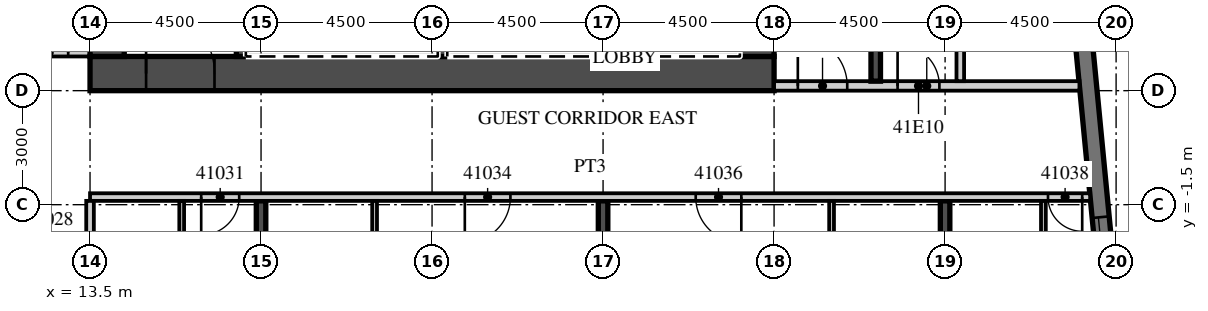
"""IFC4 building model, lengths in metres.
Left out: names, types, materials, properties, quantities, classifications, styles, units other than length and angle.
Written with IfcOpenShell. Run it as: python <this file> out.ifc"""

import sys

from ifc_helpers import new_model, si_unit, direction, frame, frame_2d, origin, place, context, subcontext, project, spatial, rectangle, extrude, element, fill, save


model = new_model("IFC4")
c1 = context("Model", 3, precision=1e-05, world=origin(), true_north=direction((0.0, 1.0)))
c2 = subcontext(c1, "Body", "Model", "MODEL_VIEW")
j1 = project(units=[si_unit("LENGTHUNIT", "METRE"), si_unit("PLANEANGLEUNIT", "RADIAN")], contexts=[c1])
p1 = place(None, origin())
s1 = spatial("IfcSite", under=j1, at=p1, CompositionType="ELEMENT")
p2 = place(p1, origin())
s2 = spatial("IfcBuilding", under=s1, at=p2, CompositionType="ELEMENT")
p3 = place(p2, frame((0.0, 0.0, 176.8)))
s3 = spatial("IfcBuildingStorey", under=s2, at=p3, CompositionType="ELEMENT", Elevation=176.8)
p4 = place(p3, frame((18.0, -19.245, 0.0), z_axis=(0.0, 0.0, 1.0), x_axis=(0.0, 1.0, 0.0)))
e1 = element("IfcWall", 1, at=p4, inside=s3, PredefinedType="SHEAR", context=c2, shape_type="SweptSolid", body=[
    extrude(rectangle(XDim=17.845, YDim=0.25, at=frame_2d((8.923, 0.0))), origin(), (0.0, 0.0, 1.0), 3.3),
])
p5 = place(p3, frame((27.0, -18.379, 0.0), z_axis=(0.0, 0.0, 1.0), x_axis=(0.0, 1.0, 0.0)))
e2 = element("IfcWall", 2, at=p5, inside=s3, PredefinedType="SHEAR", context=c2, shape_type="SweptSolid", body=[
    extrude(rectangle(XDim=16.979, YDim=0.25, at=frame_2d((8.489, 0.0))), origin(), (0.0, 0.0, 1.0), 3.3),
])
p6 = place(p3, frame((36.0, -17.512, 0.0), z_axis=(0.0, 0.0, 1.0), x_axis=(0.0, 1.0, 0.0)))
e3 = element("IfcWall", 3, at=p6, inside=s3, PredefinedType="SHEAR", context=c2, shape_type="SweptSolid", body=[
    extrude(rectangle(XDim=16.112, YDim=0.25, at=frame_2d((8.056, 0.0))), origin(), (0.0, 0.0, 1.0), 3.3),
])
p7 = place(p3, frame((41.214, -13.466, 0.0), z_axis=(0.0, 0.0, 1.0), x_axis=(-0.095847314626, 0.995396047952, 0.0)))
e4 = element("IfcWall", 4, at=p7, inside=s3, PredefinedType="SOLIDWALL", context=c2, shape_type="SweptSolid", body=[
    extrude(rectangle(XDim=34.0, YDim=0.45, at=frame_2d((17.0, 0.0))), origin(), (0.0, 0.0, 1.0), 3.02),
])
p8 = place(p7, frame((3.869, 0.0, 0.45)))
e5 = element("IfcOpeningElement", 5, at=p8, cuts=e4, PredefinedType="OPENING", context=c2, shape_type="SweptSolid", body=[
    extrude(rectangle(XDim=3.3, YDim=2.25, at=frame_2d((1.65, 1.125))), frame((0.0, 0.235, 0.0), z_axis=(0.0, -1.0, 0.0), x_axis=(1.0, 0.0, 0.0)), (0.0, 0.0, 1.0), 0.47),
])
p9 = place(p7, frame((8.39, 0.0, 0.45)))
e6 = element("IfcOpeningElement", 6, at=p9, cuts=e4, PredefinedType="OPENING", context=c2, shape_type="SweptSolid", body=[
    extrude(rectangle(XDim=3.3, YDim=2.25, at=frame_2d((1.65, 1.125))), frame((0.0, 0.235, 0.0), z_axis=(0.0, -1.0, 0.0), x_axis=(1.0, 0.0, 0.0)), (0.0, 0.0, 1.0), 0.47),
])
p10 = place(p3, frame((-13.5, 2.5, 0.0), z_axis=(0.0, 0.0, 1.0), x_axis=(1.0, 0.0, 0.0)))
e7 = element("IfcWall", 7, at=p10, inside=s3, PredefinedType="PARTITIONING", context=c2, shape_type="SweptSolid", body=[
    extrude(rectangle(XDim=27.0, YDim=0.2, at=frame_2d((13.5, 0.0))), origin(), (0.0, 0.0, 1.0), 3.02),
])
p11 = place(p10, frame((0.575, 0.0, 0.0)))
e8 = element("IfcOpeningElement", 8, at=p11, cuts=e7, PredefinedType="OPENING", context=c2, shape_type="SweptSolid", body=[
    extrude(rectangle(XDim=1.0, YDim=2.1, at=frame_2d((0.5, 1.05))), frame((0.0, 0.11, 0.0), z_axis=(0.0, -1.0, 0.0), x_axis=(1.0, 0.0, 0.0)), (0.0, 0.0, 1.0), 0.22),
])
p12 = place(p10, frame((9.863, 0.0, 0.0)))
e9 = element("IfcOpeningElement", 9, at=p12, cuts=e7, PredefinedType="OPENING", context=c2, shape_type="SweptSolid", body=[
    extrude(rectangle(XDim=1.2, YDim=2.1, at=frame_2d((0.6, 1.05))), frame((0.0, 0.11, 0.0), z_axis=(0.0, -1.0, 0.0), x_axis=(1.0, 0.0, 0.0)), (0.0, 0.0, 1.0), 0.22),
])
p13 = place(p10, frame((15.938, 0.0, 0.0)))
e10 = element("IfcOpeningElement", 10, at=p13, cuts=e7, PredefinedType="OPENING", context=c2, shape_type="SweptSolid", body=[
    extrude(rectangle(XDim=1.2, YDim=2.1, at=frame_2d((0.6, 1.05))), frame((0.0, 0.11, 0.0), z_axis=(0.0, -1.0, 0.0), x_axis=(1.0, 0.0, 0.0)), (0.0, 0.0, 1.0), 0.22),
])
p14 = place(p10, frame((25.425, 0.0, 0.0)))
e11 = element("IfcOpeningElement", 11, at=p14, cuts=e7, PredefinedType="OPENING", context=c2, shape_type="SweptSolid", body=[
    extrude(rectangle(XDim=1.0, YDim=2.1, at=frame_2d((0.5, 1.05))), frame((0.0, 0.11, 0.0), z_axis=(0.0, -1.0, 0.0), x_axis=(1.0, 0.0, 0.0)), (0.0, 0.0, 1.0), 0.22),
])
p15 = place(p3, frame((13.5, -1.3, 0.0), z_axis=(0.0, 0.0, 1.0), x_axis=(1.0, 0.0, 0.0)))
e12 = element("IfcWall", 12, at=p15, inside=s3, PredefinedType="PARTITIONING", context=c2, shape_type="SweptSolid", body=[
    extrude(rectangle(XDim=26.317, YDim=0.2, at=frame_2d((13.158, 0.0))), origin(), (0.0, 0.0, 1.0), 3.02),
])
p16 = place(p15, frame((2.925, 0.0, 0.0)))
e13 = element("IfcOpeningElement", 13, at=p16, cuts=e12, PredefinedType="OPENING", context=c2, shape_type="SweptSolid", body=[
    extrude(rectangle(XDim=1.0, YDim=2.1, at=frame_2d((0.5, 1.05))), frame((0.0, 0.11, 0.0), z_axis=(0.0, -1.0, 0.0), x_axis=(1.0, 0.0, 0.0)), (0.0, 0.0, 1.0), 0.22),
])
p17 = place(p15, frame((9.862, 0.0, 0.0)))
e14 = element("IfcOpeningElement", 14, at=p17, cuts=e12, PredefinedType="OPENING", context=c2, shape_type="SweptSolid", body=[
    extrude(rectangle(XDim=1.2, YDim=2.1, at=frame_2d((0.6, 1.05))), frame((0.0, 0.11, 0.0), z_axis=(0.0, -1.0, 0.0), x_axis=(1.0, 0.0, 0.0)), (0.0, 0.0, 1.0), 0.22),
])
p18 = place(p15, frame((15.938, 0.0, 0.0)))
e15 = element("IfcOpeningElement", 15, at=p18, cuts=e12, PredefinedType="OPENING", context=c2, shape_type="SweptSolid", body=[
    extrude(rectangle(XDim=1.2, YDim=2.1, at=frame_2d((0.6, 1.05))), frame((0.0, 0.11, 0.0), z_axis=(0.0, -1.0, 0.0), x_axis=(1.0, 0.0, 0.0)), (0.0, 0.0, 1.0), 0.22),
])
p19 = place(p15, frame((25.208, 0.0, 0.0)))
e16 = element("IfcOpeningElement", 16, at=p19, cuts=e12, PredefinedType="OPENING", context=c2, shape_type="SweptSolid", body=[
    extrude(rectangle(XDim=0.9, YDim=2.1, at=frame_2d((0.45, 1.05))), frame((0.0, 0.11, 0.0), z_axis=(0.0, -1.0, 0.0), x_axis=(1.0, 0.0, 0.0)), (0.0, 0.0, 1.0), 0.22),
])
p20 = place(p3, frame((13.5, -19.701, 0.0), z_axis=(0.0, 0.0, 1.0), x_axis=(0.0, 1.0, 0.0)))
e17 = element("IfcWall", 17, at=p20, inside=s3, PredefinedType="PARTITIONING", context=c2, shape_type="SweptSolid", body=[
    extrude(rectangle(XDim=18.301, YDim=0.2, at=frame_2d((9.15, 0.0))), origin(), (0.0, 0.0, 1.0), 3.02),
])
p21 = place(p3, frame((15.912, -6.625, 0.0), z_axis=(0.0, 0.0, 1.0), x_axis=(0.0, 1.0, 0.0)))
e18 = element("IfcWall", 18, at=p21, inside=s3, PredefinedType="PARTITIONING", context=c2, shape_type="SweptSolid", body=[
    extrude(rectangle(XDim=5.225, YDim=0.125, at=frame_2d((2.613, 0.0))), origin(), (0.0, 0.0, 1.0), 3.02),
])
p22 = place(p21, frame((1.875, 0.0, 0.0)))
e19 = element("IfcOpeningElement", 19, at=p22, cuts=e18, PredefinedType="OPENING", context=c2, shape_type="SweptSolid", body=[
    extrude(rectangle(XDim=0.9, YDim=2.1, at=frame_2d((0.45, 1.05))), frame((0.0, 0.073, 0.0), z_axis=(0.0, -1.0, 0.0), x_axis=(1.0, 0.0, 0.0)), (0.0, 0.0, 1.0), 0.145),
])
p23 = place(p3, frame((20.988, -6.625, 0.0), z_axis=(0.0, 0.0, 1.0), x_axis=(0.0, 1.0, 0.0)))
e20 = element("IfcWall", 20, at=p23, inside=s3, PredefinedType="PARTITIONING", context=c2, shape_type="SweptSolid", body=[
    extrude(rectangle(XDim=5.225, YDim=0.125, at=frame_2d((2.613, 0.0))), origin(), (0.0, 0.0, 1.0), 3.02),
])
p24 = place(p23, frame((1.875, 0.0, 0.0)))
e21 = element("IfcOpeningElement", 21, at=p24, cuts=e20, PredefinedType="OPENING", context=c2, shape_type="SweptSolid", body=[
    extrude(rectangle(XDim=0.9, YDim=2.1, at=frame_2d((0.45, 1.05))), frame((0.0, 0.073, 0.0), z_axis=(0.0, -1.0, 0.0), x_axis=(1.0, 0.0, 0.0)), (0.0, 0.0, 1.0), 0.145),
])
p25 = place(p3, frame((33.013, -6.625, 0.0), z_axis=(0.0, 0.0, 1.0), x_axis=(0.0, 1.0, 0.0)))
e22 = element("IfcWall", 22, at=p25, inside=s3, PredefinedType="PARTITIONING", context=c2, shape_type="SweptSolid", body=[
    extrude(rectangle(XDim=5.225, YDim=0.125, at=frame_2d((2.613, 0.0))), origin(), (0.0, 0.0, 1.0), 3.02),
])
p26 = place(p25, frame((1.875, 0.0, 0.0)))
e23 = element("IfcOpeningElement", 23, at=p26, cuts=e22, PredefinedType="OPENING", context=c2, shape_type="SweptSolid", body=[
    extrude(rectangle(XDim=0.9, YDim=2.1, at=frame_2d((0.45, 1.05))), frame((0.0, 0.073, 0.0), z_axis=(0.0, -1.0, 0.0), x_axis=(1.0, 0.0, 0.0)), (0.0, 0.0, 1.0), 0.145),
])
p27 = place(p3, frame((38.587, -6.445, 0.0), z_axis=(0.0, 0.0, 1.0), x_axis=(0.0, 1.0, 0.0)))
e24 = element("IfcWall", 24, at=p27, inside=s3, PredefinedType="PARTITIONING", context=c2, shape_type="SweptSolid", body=[
    extrude(rectangle(XDim=5.045, YDim=0.125, at=frame_2d((2.522, 0.0))), origin(), (0.0, 0.0, 1.0), 3.02),
])
p28 = place(p27, frame((1.695, 0.0, 0.0)))
e25 = element("IfcOpeningElement", 25, at=p28, cuts=e24, PredefinedType="OPENING", context=c2, shape_type="SweptSolid", body=[
    extrude(rectangle(XDim=0.9, YDim=2.1, at=frame_2d((0.45, 1.05))), frame((0.0, 0.073, 0.0), z_axis=(0.0, -1.0, 0.0), x_axis=(1.0, 0.0, 0.0)), (0.0, 0.0, 1.0), 0.145),
])
p29 = place(p3, frame((13.5, 1.95, 0.0), z_axis=(0.0, 0.0, 1.0), x_axis=(1.0, 0.0, 0.0)))
e26 = element("IfcWall", 26, at=p29, inside=s3, PredefinedType="SHEAR", context=c2, shape_type="SweptSolid", body=[
    extrude(rectangle(XDim=18.0, YDim=0.9, at=frame_2d((9.0, 0.0))), origin(), (0.0, 0.0, 1.0), 3.02),
])
p30 = place(p29, frame((1.475, 0.0, 0.0)))
e27 = element("IfcOpeningElement", 27, at=p30, cuts=e26, PredefinedType="OPENING", context=c2, shape_type="SweptSolid", body=[
    extrude(rectangle(XDim=1.8, YDim=2.1, at=frame_2d((0.9, 1.05))), frame((0.0, 0.46, 0.0), z_axis=(0.0, -1.0, 0.0), x_axis=(1.0, 0.0, 0.0)), (0.0, 0.0, 1.0), 0.92),
])
p31 = place(p3, frame((31.05, 2.4, 0.0), z_axis=(0.0, 0.0, 1.0), x_axis=(0.0, 1.0, 0.0)))
e28 = element("IfcWall", 28, at=p31, inside=s3, PredefinedType="SHEAR", context=c2, shape_type="SweptSolid", body=[
    extrude(rectangle(XDim=12.8, YDim=0.9, at=frame_2d((6.4, 0.0))), origin(), (0.0, 0.0, 1.0), 3.02),
])
p32 = place(p31, frame((0.2, 0.0, 0.0)))
e29 = element("IfcOpeningElement", 29, at=p32, cuts=e28, PredefinedType="OPENING", context=c2, shape_type="SweptSolid", body=[
    extrude(rectangle(XDim=1.1, YDim=2.1, at=frame_2d((0.55, 1.05))), frame((0.0, 0.46, 0.0), z_axis=(0.0, -1.0, 0.0), x_axis=(1.0, 0.0, 0.0)), (0.0, 0.0, 1.0), 0.92),
])
p33 = place(p3, frame((13.95, 2.4, 0.0), z_axis=(0.0, 0.0, 1.0), x_axis=(0.0, 1.0, 0.0)))
e30 = element("IfcWall", 30, at=p33, inside=s3, PredefinedType="SHEAR", context=c2, shape_type="SweptSolid", body=[
    extrude(rectangle(XDim=12.2, YDim=0.9, at=frame_2d((6.1, 0.0))), origin(), (0.0, 0.0, 1.0), 3.02),
])
p34 = place(p3, frame((17.475, 2.4, 0.0), z_axis=(0.0, 0.0, 1.0), x_axis=(0.0, 1.0, 0.0)))
e31 = element("IfcWall", 31, at=p34, inside=s3, PredefinedType="SHEAR", context=c2, shape_type="SweptSolid", body=[
    extrude(rectangle(XDim=3.15, YDim=0.25, at=frame_2d((1.575, 0.0))), origin(), (0.0, 0.0, 1.0), 3.02),
])
for number, where, z_axis, x_axis in (
    (32, (27.975, 2.4, 0.0), (0.0, 0.0, 1.0), (0.0, 1.0, 0.0)),
    (33, (22.775, 2.4, 0.0), (0.0, 0.0, 1.0), (0.0, 1.0, 0.0)),
):
    element("IfcWall", number, at=place(p3, frame(where, z_axis=z_axis, x_axis=x_axis)), inside=s3, PredefinedType="SHEAR", context=c2, shape_type="SweptSolid", body=[
        extrude(rectangle(XDim=2.9, YDim=0.25, at=frame_2d((1.45, 0.0))), origin(), (0.0, 0.0, 1.0), 3.02),
    ])
p35 = place(p3, frame((31.5, 1.625, 0.0), z_axis=(0.0, 0.0, 1.0), x_axis=(1.0, 0.0, 0.0)))
e34 = element("IfcWall", 34, at=p35, inside=s3, PredefinedType="PARTITIONING", context=c2, shape_type="SweptSolid", body=[
    extrude(rectangle(XDim=8.035, YDim=0.25, at=frame_2d((4.018, 0.0))), origin(), (0.0, 0.0, 1.0), 3.02),
])
p36 = place(p35, frame((0.625, 0.0, 0.0)))
e35 = element("IfcOpeningElement", 35, at=p36, cuts=e34, PredefinedType="OPENING", context=c2, shape_type="SweptSolid", body=[
    extrude(rectangle(XDim=1.3, YDim=2.1, at=frame_2d((0.65, 1.05))), frame((0.0, 0.135, 0.0), z_axis=(0.0, -1.0, 0.0), x_axis=(1.0, 0.0, 0.0)), (0.0, 0.0, 1.0), 0.27),
])
p37 = place(p35, frame((3.25, 0.0, 0.0)))
e36 = element("IfcOpeningElement", 36, at=p37, cuts=e34, PredefinedType="OPENING", context=c2, shape_type="SweptSolid", body=[
    extrude(rectangle(XDim=1.1, YDim=2.1, at=frame_2d((0.55, 1.05))), frame((0.0, 0.135, 0.0), z_axis=(0.0, -1.0, 0.0), x_axis=(1.0, 0.0, 0.0)), (0.0, 0.0, 1.0), 0.27),
])
p38 = place(p3, frame((34.175, 1.75, 0.0), z_axis=(0.0, 0.0, 1.0), x_axis=(0.0, 1.0, 0.0)))
e37 = element("IfcWall", 37, at=p38, inside=s3, PredefinedType="SHEAR", context=c2, shape_type="SweptSolid", body=[
    extrude(rectangle(XDim=8.35, YDim=0.25, at=frame_2d((4.175, 0.0))), origin(), (0.0, 0.0, 1.0), 3.02),
])
p39 = place(p3, frame((36.4, 1.75, 0.0), z_axis=(0.0, 0.0, 1.0), x_axis=(0.0, 1.0, 0.0)))
e38 = element("IfcWall", 38, at=p39, inside=s3, PredefinedType="PARTITIONING", context=c2, shape_type="SweptSolid", body=[
    extrude(rectangle(XDim=15.95, YDim=0.2, at=frame_2d((7.975, 0.0))), origin(), (0.0, 0.0, 1.0), 3.02),
])
p40 = place(p39, frame((14.7, 0.0, 0.0)))
e39 = element("IfcOpeningElement", 39, at=p40, cuts=e38, PredefinedType="OPENING", context=c2, shape_type="SweptSolid", body=[
    extrude(rectangle(XDim=0.9, YDim=2.1, at=frame_2d((0.45, 1.05))), frame((0.0, 0.11, 0.0), z_axis=(0.0, -1.0, 0.0), x_axis=(1.0, 0.0, 0.0)), (0.0, 0.0, 1.0), 0.22),
])
p41 = place(p9, origin())
e40 = element("IfcWindow", 40, at=p41, inside=s3, PartitioningType="SINGLE_PANEL", PredefinedType="WINDOW", context=c2, shape_type="SweptSolid", body=[
    extrude(rectangle(XDim=3.3, YDim=2.25, at=frame_2d((1.65, 1.125))), frame((0.0, 0.09, 0.0), z_axis=(0.0, -1.0, 0.0), x_axis=(1.0, 0.0, 0.0)), (0.0, 0.0, 1.0), 0.06),
])
fill(e6, e40)
p42 = place(p14, origin())
e41 = element("IfcDoor", 41, at=p42, inside=s3, OperationType="SINGLE_SWING_RIGHT", PredefinedType="DOOR", context=c2, shape_type="SweptSolid", body=[
    extrude(rectangle(XDim=1.0, YDim=2.1, at=frame_2d((0.5, 1.05))), frame((0.0, 0.025, 0.0), z_axis=(0.0, -1.0, 0.0), x_axis=(1.0, 0.0, 0.0)), (0.0, 0.0, 1.0), 0.05),
])
fill(e11, e41)
p43 = place(p16, origin())
e42 = element("IfcDoor", 42, at=p43, inside=s3, OperationType="SINGLE_SWING_LEFT", PredefinedType="DOOR", context=c2, shape_type="SweptSolid", body=[
    extrude(rectangle(XDim=1.0, YDim=2.1, at=frame_2d((0.5, 1.05))), frame((0.0, 0.025, 0.0), z_axis=(0.0, -1.0, 0.0), x_axis=(1.0, 0.0, 0.0)), (0.0, 0.0, 1.0), 0.05),
])
fill(e13, e42)
p44 = place(p17, origin())
e43 = element("IfcDoor", 43, at=p44, inside=s3, OperationType="SINGLE_SWING_LEFT", PredefinedType="DOOR", context=c2, shape_type="SweptSolid", body=[
    extrude(rectangle(XDim=1.2, YDim=2.1, at=frame_2d((0.6, 1.05))), frame((0.0, 0.025, 0.0), z_axis=(0.0, -1.0, 0.0), x_axis=(1.0, 0.0, 0.0)), (0.0, 0.0, 1.0), 0.05),
])
fill(e14, e43)
p45 = place(p18, origin())
e44 = element("IfcDoor", 44, at=p45, inside=s3, OperationType="SINGLE_SWING_RIGHT", PredefinedType="DOOR", context=c2, shape_type="SweptSolid", body=[
    extrude(rectangle(XDim=1.2, YDim=2.1, at=frame_2d((0.6, 1.05))), frame((0.0, 0.025, 0.0), z_axis=(0.0, -1.0, 0.0), x_axis=(1.0, 0.0, 0.0)), (0.0, 0.0, 1.0), 0.05),
])
fill(e15, e44)
p46 = place(p19, origin())
e45 = element("IfcDoor", 45, at=p46, inside=s3, OperationType="SINGLE_SWING_RIGHT", PredefinedType="DOOR", context=c2, shape_type="SweptSolid", body=[
    extrude(rectangle(XDim=0.9, YDim=2.1, at=frame_2d((0.45, 1.05))), frame((0.0, 0.025, 0.0), z_axis=(0.0, -1.0, 0.0), x_axis=(1.0, 0.0, 0.0)), (0.0, 0.0, 1.0), 0.05),
])
fill(e16, e45)
p47 = place(p30, origin())
e46 = element("IfcDoor", 46, at=p47, inside=s3, OperationType="DOUBLE_DOOR_DOUBLE_SWING", PredefinedType="DOOR", context=c2, shape_type="SweptSolid", body=[
    extrude(rectangle(XDim=1.8, YDim=2.1, at=frame_2d((0.9, 1.05))), frame((0.0, 0.025, 0.0), z_axis=(0.0, -1.0, 0.0), x_axis=(1.0, 0.0, 0.0)), (0.0, 0.0, 1.0), 0.05),
])
fill(e27, e46)
p48 = place(p36, origin())
e47 = element("IfcDoor", 47, at=p48, inside=s3, OperationType="SINGLE_SWING_LEFT", PredefinedType="DOOR", context=c2, shape_type="SweptSolid", body=[
    extrude(rectangle(XDim=1.3, YDim=2.1, at=frame_2d((0.65, 1.05))), frame((0.0, 0.025, 0.0), z_axis=(0.0, -1.0, 0.0), x_axis=(1.0, 0.0, 0.0)), (0.0, 0.0, 1.0), 0.05),
])
fill(e35, e47)
p49 = place(p37, origin())
e48 = element("IfcDoor", 48, at=p49, inside=s3, OperationType="SINGLE_SWING_LEFT", PredefinedType="DOOR", context=c2, shape_type="SweptSolid", body=[
    extrude(rectangle(XDim=1.1, YDim=2.1, at=frame_2d((0.55, 1.05))), frame((0.0, 0.025, 0.0), z_axis=(0.0, -1.0, 0.0), x_axis=(1.0, 0.0, 0.0)), (0.0, 0.0, 1.0), 0.05),
])
fill(e36, e48)
save(model, sys.argv[1])
